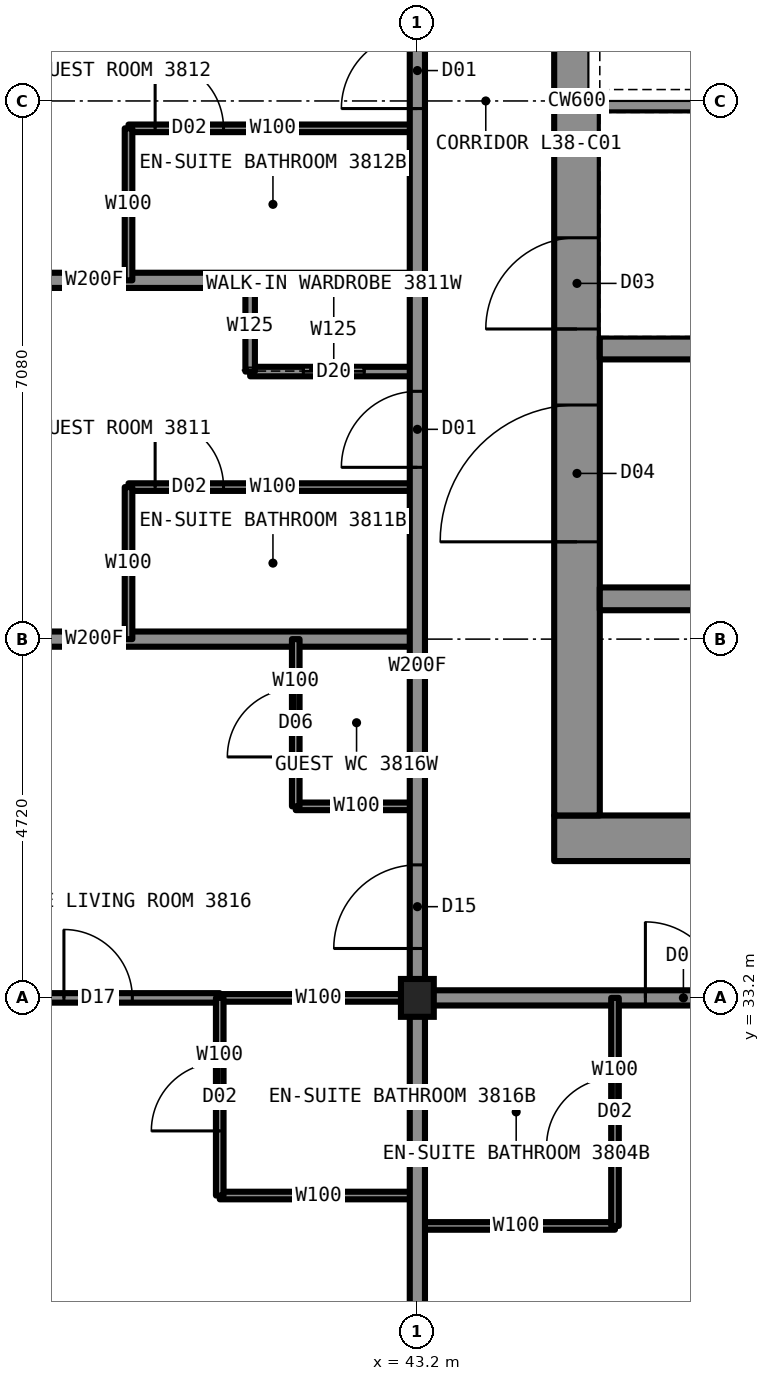
"""IFC4 building model, lengths in metres.
Left out: names, types, materials, properties, quantities, classifications, styles, units other than length and angle.
Written with IfcOpenShell. Run it as: python <this file> out.ifc"""

import sys

from ifc_helpers import new_model, si_unit, direction, frame, frame_2d, origin, origin_2d, place, context, subcontext, project, spatial, rectangle, i_section, extrude, element, fill, save


model = new_model("IFC4")
c1 = context("Model", 3, precision=1e-05, world=origin(), true_north=direction((0.0, 1.0)))
c2 = subcontext(c1, "Body", "Model", "MODEL_VIEW")
j1 = project(units=[si_unit("LENGTHUNIT", "METRE"), si_unit("PLANEANGLEUNIT", "RADIAN")], contexts=[c1])
p1 = place(None, origin())
s1 = spatial("IfcSite", under=j1, at=p1, CompositionType="ELEMENT")
p2 = place(p1, origin())
s2 = spatial("IfcBuilding", under=s1, at=p2, CompositionType="ELEMENT")
p3 = place(p2, frame((0.0, 0.0, 135.4)))
s3 = spatial("IfcBuildingStorey", under=s2, at=p3, CompositionType="ELEMENT", Elevation=135.4)
p4 = place(p3, frame((43.2, 33.2, 0.0), z_axis=(0.0, 0.0, 1.0), x_axis=(1.0, 0.0, 0.0)))
e1 = element("IfcColumn", 1, at=p4, inside=s3, PredefinedType="COLUMN", context=c2, shape_type="SweptSolid", body=[
    extrude(i_section(OverallWidth=0.432, OverallDepth=0.498, WebThickness=0.056, FlangeThickness=0.089, at=origin_2d()), origin(), (0.0, 0.0, 1.0), 3.5),
])
p5 = place(p3, frame((45.0, 35.3, 0.0), z_axis=(0.0, 0.0, 1.0), x_axis=(1.0, 0.0, 0.0)))
e2 = element("IfcWall", 2, at=p5, inside=s3, PredefinedType="SHEAR", context=c2, shape_type="SweptSolid", body=[
    extrude(rectangle(XDim=20.0, YDim=0.6, at=frame_2d((10.0, 0.0))), origin(), (0.0, 0.0, 1.0), 3.5),
])
p6 = place(p3, frame((45.3, 35.6, 0.0), z_axis=(0.0, 0.0, 1.0), x_axis=(0.0, 1.0, 0.0)))
e3 = element("IfcWall", 3, at=p6, inside=s3, PredefinedType="SHEAR", context=c2, shape_type="SweptSolid", body=[
    extrude(rectangle(XDim=18.8, YDim=0.6, at=frame_2d((9.4, 0.0))), origin(), (0.0, 0.0, 1.0), 3.5),
])
p7 = place(p6, frame((13.4, 0.0, 0.0)))
e4 = element("IfcOpeningElement", 4, at=p7, cuts=e3, PredefinedType="OPENING", context=c2, shape_type="SweptSolid", body=[
    extrude(rectangle(XDim=1.8, YDim=2.2, at=frame_2d((0.9, 1.1))), frame((0.0, 0.31, 0.0), z_axis=(0.0, -1.0, 0.0), x_axis=(1.0, 0.0, 0.0)), (0.0, 0.0, 1.0), 0.62),
])
p8 = place(p6, frame((3.6, 0.0, 0.0)))
e5 = element("IfcOpeningElement", 5, at=p8, cuts=e3, PredefinedType="OPENING", context=c2, shape_type="SweptSolid", body=[
    extrude(rectangle(XDim=1.8, YDim=2.2, at=frame_2d((0.9, 1.1))), frame((0.0, 0.31, 0.0), z_axis=(0.0, -1.0, 0.0), x_axis=(1.0, 0.0, 0.0)), (0.0, 0.0, 1.0), 0.62),
])
p9 = place(p6, frame((6.4, 0.0, 0.0)))
e6 = element("IfcOpeningElement", 6, at=p9, cuts=e3, PredefinedType="OPENING", context=c2, shape_type="SweptSolid", body=[
    extrude(rectangle(XDim=1.2, YDim=2.2, at=frame_2d((0.6, 1.1))), frame((0.0, 0.31, 0.0), z_axis=(0.0, -1.0, 0.0), x_axis=(1.0, 0.0, 0.0)), (0.0, 0.0, 1.0), 0.62),
])
p10 = place(p3, frame((45.6, 38.45, 0.0), z_axis=(0.0, 0.0, 1.0), x_axis=(1.0, 0.0, 0.0)))
e7 = element("IfcWall", 7, at=p10, inside=s3, PredefinedType="SHEAR", context=c2, shape_type="SweptSolid", body=[
    extrude(rectangle(XDim=18.8, YDim=0.3, at=frame_2d((9.4, 0.0))), origin(), (0.0, 0.0, 1.0), 3.5),
])
p11 = place(p3, frame((45.6, 41.75, 0.0), z_axis=(0.0, 0.0, 1.0), x_axis=(1.0, 0.0, 0.0)))
e8 = element("IfcWall", 8, at=p11, inside=s3, PredefinedType="SHEAR", context=c2, shape_type="SweptSolid", body=[
    extrude(rectangle(XDim=7.1, YDim=0.3, at=frame_2d((3.55, 0.0))), origin(), (0.0, 0.0, 1.0), 3.5),
])
p12 = place(p3, frame((45.6, 45.0, 0.0), z_axis=(0.0, 0.0, 1.0), x_axis=(1.0, 0.0, 0.0)))
e9 = element("IfcWall", 9, at=p12, inside=s3, PredefinedType="SHEAR", context=c2, shape_type="SweptSolid", body=[
    extrude(rectangle(XDim=6.8, YDim=0.3, at=frame_2d((3.4, 0.0))), origin(), (0.0, 0.0, 1.0), 3.5),
])
p13 = place(p3, frame((39.4, 44.64, 0.0), z_axis=(0.0, 0.0, 1.0), x_axis=(1.0, 0.0, 0.0)))
e10 = element("IfcWall", 10, at=p13, inside=s3, PredefinedType="PARTITIONING", context=c2, shape_type="SweptSolid", body=[
    extrude(rectangle(XDim=3.8, YDim=0.1, at=frame_2d((1.9, 0.0))), origin(), (0.0, 0.0, 1.0), 3.33),
])
p14 = place(p13, frame((0.35, 0.0, 0.0)))
e11 = element("IfcOpeningElement", 11, at=p14, cuts=e10, PredefinedType="OPENING", context=c2, shape_type="SweptSolid", body=[
    extrude(rectangle(XDim=0.9, YDim=2.1, at=frame_2d((0.45, 1.05))), frame((0.0, 0.06, 0.0), z_axis=(0.0, -1.0, 0.0), x_axis=(1.0, 0.0, 0.0)), (0.0, 0.0, 1.0), 0.12),
])
p15 = place(p3, frame((40.6, 33.2, 0.0), z_axis=(0.0, 0.0, 1.0), x_axis=(1.0, 0.0, 0.0)))
e12 = element("IfcWall", 12, at=p15, inside=s3, PredefinedType="PARTITIONING", context=c2, shape_type="SweptSolid", body=[
    extrude(rectangle(XDim=2.6, YDim=0.1, at=frame_2d((1.3, 0.0))), origin(), (0.0, 0.0, 1.0), 2.573),
])
p16 = place(p3, frame((43.2, 33.2, 0.0), z_axis=(0.0, 0.0, 1.0), x_axis=(1.0, 0.0, 0.0)))
e13 = element("IfcWall", 13, at=p16, inside=s3, PredefinedType="PARTITIONING", context=c2, shape_type="SweptSolid", body=[
    extrude(rectangle(XDim=23.6, YDim=0.2, at=frame_2d((11.8, 0.0))), origin(), (0.0, 0.0, 1.0), 3.33),
])
p17 = place(p16, frame((3.0, 0.0, 0.0)))
e14 = element("IfcOpeningElement", 14, at=p17, cuts=e13, PredefinedType="OPENING", context=c2, shape_type="SweptSolid", body=[
    extrude(rectangle(XDim=1.0, YDim=2.2, at=frame_2d((0.5, 1.1))), frame((0.0, 0.11, 0.0), z_axis=(0.0, -1.0, 0.0), x_axis=(1.0, 0.0, 0.0)), (0.0, 0.0, 1.0), 0.22),
])
p18 = place(p16, frame((9.84, 0.0, 0.0)))
e15 = element("IfcOpeningElement", 15, at=p18, cuts=e13, PredefinedType="OPENING", context=c2, shape_type="SweptSolid", body=[
    extrude(rectangle(XDim=1.0, YDim=2.2, at=frame_2d((0.5, 1.1))), frame((0.0, 0.11, 0.0), z_axis=(0.0, -1.0, 0.0), x_axis=(1.0, 0.0, 0.0)), (0.0, 0.0, 1.0), 0.22),
])
p19 = place(p16, frame((16.71, 0.0, 0.0)))
e16 = element("IfcOpeningElement", 16, at=p19, cuts=e13, PredefinedType="OPENING", context=c2, shape_type="SweptSolid", body=[
    extrude(rectangle(XDim=1.0, YDim=2.2, at=frame_2d((0.5, 1.1))), frame((0.0, 0.11, 0.0), z_axis=(0.0, -1.0, 0.0), x_axis=(1.0, 0.0, 0.0)), (0.0, 0.0, 1.0), 0.22),
])
p20 = place(p16, frame((20.34, 0.0, 0.0)))
e17 = element("IfcOpeningElement", 17, at=p20, cuts=e13, PredefinedType="OPENING", context=c2, shape_type="SweptSolid", body=[
    extrude(rectangle(XDim=1.0, YDim=2.2, at=frame_2d((0.5, 1.1))), frame((0.0, 0.11, 0.0), z_axis=(0.0, -1.0, 0.0), x_axis=(1.0, 0.0, 0.0)), (0.0, 0.0, 1.0), 0.22),
])
p21 = place(p3, frame((34.7, 33.2, 0.0), z_axis=(0.0, 0.0, 1.0), x_axis=(1.0, 0.0, 0.0)))
e18 = element("IfcWall", 18, at=p21, inside=s3, PredefinedType="PARTITIONING", context=c2, shape_type="SweptSolid", body=[
    extrude(rectangle(XDim=5.9, YDim=0.125, at=frame_2d((2.95, 0.0))), origin(), (0.0, 0.0, 1.0), 2.573),
])
p22 = place(p21, frame((3.85, 0.0, 0.0)))
e19 = element("IfcOpeningElement", 19, at=p22, cuts=e18, PredefinedType="OPENING", context=c2, shape_type="SweptSolid", body=[
    extrude(rectangle(XDim=0.9, YDim=2.2, at=frame_2d((0.45, 1.1))), frame((0.0, 0.073, 0.0), z_axis=(0.0, -1.0, 0.0), x_axis=(1.0, 0.0, 0.0)), (0.0, 0.0, 1.0), 0.145),
])
p23 = place(p3, frame((40.6, 30.6, 0.0), z_axis=(0.0, 0.0, 1.0), x_axis=(1.0, 0.0, 0.0)))
e20 = element("IfcWall", 20, at=p23, inside=s3, PredefinedType="PARTITIONING", context=c2, shape_type="SweptSolid", body=[
    extrude(rectangle(XDim=2.6, YDim=0.1, at=frame_2d((1.3, 0.0))), origin(), (0.0, 0.0, 1.0), 3.33),
])
p24 = place(p3, frame((43.2, 30.2, 0.0), z_axis=(0.0, 0.0, 1.0), x_axis=(1.0, 0.0, 0.0)))
e21 = element("IfcWall", 21, at=p24, inside=s3, PredefinedType="PARTITIONING", context=c2, shape_type="SweptSolid", body=[
    extrude(rectangle(XDim=2.6, YDim=0.1, at=frame_2d((1.3, 0.0))), origin(), (0.0, 0.0, 1.0), 3.33),
])
p25 = place(p3, frame((34.7, 42.64, 0.0), z_axis=(0.0, 0.0, 1.0), x_axis=(1.0, 0.0, 0.0)))
e22 = element("IfcWall", 22, at=p25, inside=s3, PredefinedType="PARTITIONING", context=c2, shape_type="SweptSolid", body=[
    extrude(rectangle(XDim=8.5, YDim=0.2, at=frame_2d((4.25, 0.0))), origin(), (0.0, 0.0, 1.0), 2.731),
])
p26 = place(p3, frame((41.0, 41.44, 0.0), z_axis=(0.0, 0.0, 1.0), x_axis=(1.0, 0.0, 0.0)))
e23 = element("IfcWall", 23, at=p26, inside=s3, PredefinedType="PARTITIONING", context=c2, shape_type="SweptSolid", body=[
    extrude(rectangle(XDim=2.2, YDim=0.125, at=frame_2d((1.1, 0.0))), origin(), (0.0, 0.0, 1.0), 3.33),
])
p27 = place(p26, frame((0.7, 0.0, 0.0)))
e24 = element("IfcOpeningElement", 24, at=p27, cuts=e23, PredefinedType="OPENING", context=c2, shape_type="SweptSolid", body=[
    extrude(rectangle(XDim=0.8, YDim=2.1, at=frame_2d((0.4, 1.05))), frame((0.0, 0.073, 0.0), z_axis=(0.0, -1.0, 0.0), x_axis=(1.0, 0.0, 0.0)), (0.0, 0.0, 1.0), 0.145),
])
p28 = place(p3, frame((39.4, 39.92, 0.0), z_axis=(0.0, 0.0, 1.0), x_axis=(1.0, 0.0, 0.0)))
e25 = element("IfcWall", 25, at=p28, inside=s3, PredefinedType="PARTITIONING", context=c2, shape_type="SweptSolid", body=[
    extrude(rectangle(XDim=3.8, YDim=0.1, at=frame_2d((1.9, 0.0))), origin(), (0.0, 0.0, 1.0), 3.33),
])
p29 = place(p28, frame((0.35, 0.0, 0.0)))
e26 = element("IfcOpeningElement", 26, at=p29, cuts=e25, PredefinedType="OPENING", context=c2, shape_type="SweptSolid", body=[
    extrude(rectangle(XDim=0.9, YDim=2.1, at=frame_2d((0.45, 1.05))), frame((0.0, 0.06, 0.0), z_axis=(0.0, -1.0, 0.0), x_axis=(1.0, 0.0, 0.0)), (0.0, 0.0, 1.0), 0.12),
])
p30 = place(p3, frame((34.7, 37.92, 0.0), z_axis=(0.0, 0.0, 1.0), x_axis=(1.0, 0.0, 0.0)))
e27 = element("IfcWall", 27, at=p30, inside=s3, PredefinedType="PARTITIONING", context=c2, shape_type="SweptSolid", body=[
    extrude(rectangle(XDim=8.5, YDim=0.2, at=frame_2d((4.25, 0.0))), origin(), (0.0, 0.0, 1.0), 2.573),
])
p31 = place(p3, frame((41.6, 35.72, 0.0), z_axis=(0.0, 0.0, 1.0), x_axis=(1.0, 0.0, 0.0)))
e28 = element("IfcWall", 28, at=p31, inside=s3, PredefinedType="PARTITIONING", context=c2, shape_type="SweptSolid", body=[
    extrude(rectangle(XDim=1.6, YDim=0.1, at=frame_2d((0.8, 0.0))), origin(), (0.0, 0.0, 1.0), 3.33),
])
p32 = place(p3, frame((43.2, 33.2, 0.0), z_axis=(0.0, 0.0, 1.0), x_axis=(0.0, 1.0, 0.0)))
e29 = element("IfcWall", 29, at=p32, inside=s3, PredefinedType="PARTITIONING", context=c2, shape_type="SweptSolid", body=[
    extrude(rectangle(XDim=23.6, YDim=0.2, at=frame_2d((11.8, 0.0))), origin(), (0.0, 0.0, 1.0), 3.33),
])
p33 = place(p32, frame((6.98, 0.0, 0.0)))
e30 = element("IfcOpeningElement", 30, at=p33, cuts=e29, PredefinedType="OPENING", context=c2, shape_type="SweptSolid", body=[
    extrude(rectangle(XDim=1.0, YDim=2.2, at=frame_2d((0.5, 1.1))), frame((0.0, 0.11, 0.0), z_axis=(0.0, -1.0, 0.0), x_axis=(1.0, 0.0, 0.0)), (0.0, 0.0, 1.0), 0.22),
])
p34 = place(p32, frame((11.7, 0.0, 0.0)))
e31 = element("IfcOpeningElement", 31, at=p34, cuts=e29, PredefinedType="OPENING", context=c2, shape_type="SweptSolid", body=[
    extrude(rectangle(XDim=1.0, YDim=2.2, at=frame_2d((0.5, 1.1))), frame((0.0, 0.11, 0.0), z_axis=(0.0, -1.0, 0.0), x_axis=(1.0, 0.0, 0.0)), (0.0, 0.0, 1.0), 0.22),
])
p35 = place(p32, frame((15.62, 0.0, 0.0)))
e32 = element("IfcOpeningElement", 32, at=p35, cuts=e29, PredefinedType="OPENING", context=c2, shape_type="SweptSolid", body=[
    extrude(rectangle(XDim=1.0, YDim=2.2, at=frame_2d((0.5, 1.1))), frame((0.0, 0.11, 0.0), z_axis=(0.0, -1.0, 0.0), x_axis=(1.0, 0.0, 0.0)), (0.0, 0.0, 1.0), 0.22),
])
p36 = place(p32, frame((21.85, 0.0, 0.0)))
e33 = element("IfcOpeningElement", 33, at=p36, cuts=e29, PredefinedType="OPENING", context=c2, shape_type="SweptSolid", body=[
    extrude(rectangle(XDim=1.1, YDim=2.2, at=frame_2d((0.55, 1.1))), frame((0.0, 0.11, 0.0), z_axis=(0.0, -1.0, 0.0), x_axis=(1.0, 0.0, 0.0)), (0.0, 0.0, 1.0), 0.22),
])
p37 = place(p32, frame((0.65, 0.0, 0.0)))
e34 = element("IfcOpeningElement", 34, at=p37, cuts=e29, PredefinedType="OPENING", context=c2, shape_type="SweptSolid", body=[
    extrude(rectangle(XDim=1.1, YDim=2.2, at=frame_2d((0.55, 1.1))), frame((0.0, 0.11, 0.0), z_axis=(0.0, -1.0, 0.0), x_axis=(1.0, 0.0, 0.0)), (0.0, 0.0, 1.0), 0.22),
])
p38 = place(p3, frame((43.2, 24.7, 0.0), z_axis=(0.0, 0.0, 1.0), x_axis=(0.0, 1.0, 0.0)))
e35 = element("IfcWall", 35, at=p38, inside=s3, PredefinedType="PARTITIONING", context=c2, shape_type="SweptSolid", body=[
    extrude(rectangle(XDim=8.5, YDim=0.2, at=frame_2d((4.25, 0.0))), origin(), (0.0, 0.0, 1.0), 2.573),
])
p39 = place(p3, frame((41.6, 35.72, 0.0), z_axis=(0.0, 0.0, 1.0), x_axis=(0.0, 1.0, 0.0)))
e36 = element("IfcWall", 36, at=p39, inside=s3, PredefinedType="PARTITIONING", context=c2, shape_type="SweptSolid", body=[
    extrude(rectangle(XDim=2.2, YDim=0.1, at=frame_2d((1.1, 0.0))), origin(), (0.0, 0.0, 1.0), 3.33),
])
p40 = place(p39, frame((0.65, 0.0, 0.0)))
e37 = element("IfcOpeningElement", 37, at=p40, cuts=e36, PredefinedType="OPENING", context=c2, shape_type="SweptSolid", body=[
    extrude(rectangle(XDim=0.9, YDim=2.1, at=frame_2d((0.45, 1.05))), frame((0.0, 0.06, 0.0), z_axis=(0.0, -1.0, 0.0), x_axis=(1.0, 0.0, 0.0)), (0.0, 0.0, 1.0), 0.12),
])
p41 = place(p3, frame((41.0, 41.44, 0.0), z_axis=(0.0, 0.0, 1.0), x_axis=(0.0, 1.0, 0.0)))
e38 = element("IfcWall", 38, at=p41, inside=s3, PredefinedType="PARTITIONING", context=c2, shape_type="SweptSolid", body=[
    extrude(rectangle(XDim=1.2, YDim=0.125, at=frame_2d((0.6, 0.0))), origin(), (0.0, 0.0, 1.0), 3.33),
])
p42 = place(p3, frame((40.6, 30.6, 0.0), z_axis=(0.0, 0.0, 1.0), x_axis=(0.0, 1.0, 0.0)))
e39 = element("IfcWall", 39, at=p42, inside=s3, PredefinedType="PARTITIONING", context=c2, shape_type="SweptSolid", body=[
    extrude(rectangle(XDim=2.6, YDim=0.1, at=frame_2d((1.3, 0.0))), origin(), (0.0, 0.0, 1.0), 3.33),
])
p43 = place(p42, frame((0.85, 0.0, 0.0)))
e40 = element("IfcOpeningElement", 40, at=p43, cuts=e39, PredefinedType="OPENING", context=c2, shape_type="SweptSolid", body=[
    extrude(rectangle(XDim=0.9, YDim=2.1, at=frame_2d((0.45, 1.05))), frame((0.0, 0.06, 0.0), z_axis=(0.0, -1.0, 0.0), x_axis=(1.0, 0.0, 0.0)), (0.0, 0.0, 1.0), 0.12),
])
for number, where, z_axis, x_axis in (
    (41, (39.4, 37.92, 0.0), (0.0, 0.0, 1.0), (0.0, 1.0, 0.0)),
    (42, (39.4, 42.64, 0.0), (0.0, 0.0, 1.0), (0.0, 1.0, 0.0)),
):
    element("IfcWall", number, at=place(p3, frame(where, z_axis=z_axis, x_axis=x_axis)), inside=s3, PredefinedType="PARTITIONING", context=c2, shape_type="SweptSolid", body=[
        extrude(rectangle(XDim=2.0, YDim=0.1, at=frame_2d((1.0, 0.0))), origin(), (0.0, 0.0, 1.0), 3.33),
    ])
p44 = place(p3, frame((45.8, 30.2, 0.0), z_axis=(0.0, 0.0, 1.0), x_axis=(0.0, 1.0, 0.0)))
e43 = element("IfcWall", 43, at=p44, inside=s3, PredefinedType="PARTITIONING", context=c2, shape_type="SweptSolid", body=[
    extrude(rectangle(XDim=3.0, YDim=0.1, at=frame_2d((1.5, 0.0))), origin(), (0.0, 0.0, 1.0), 3.33),
])
p45 = place(p44, frame((1.05, 0.0, 0.0)))
e44 = element("IfcOpeningElement", 44, at=p45, cuts=e43, PredefinedType="OPENING", context=c2, shape_type="SweptSolid", body=[
    extrude(rectangle(XDim=0.9, YDim=2.1, at=frame_2d((0.45, 1.05))), frame((0.0, 0.06, 0.0), z_axis=(0.0, -1.0, 0.0), x_axis=(1.0, 0.0, 0.0)), (0.0, 0.0, 1.0), 0.12),
])
p46 = place(p17, origin())
e45 = element("IfcDoor", 45, at=p46, inside=s3, OperationType="SINGLE_SWING_LEFT", PredefinedType="DOOR", context=c2, shape_type="SweptSolid", body=[
    extrude(rectangle(XDim=1.0, YDim=2.2, at=frame_2d((0.5, 1.1))), frame((0.0, 0.025, 0.0), z_axis=(0.0, -1.0, 0.0), x_axis=(1.0, 0.0, 0.0)), (0.0, 0.0, 1.0), 0.05),
])
fill(e14, e45)
p47 = place(p45, origin())
e46 = element("IfcDoor", 46, at=p47, inside=s3, OperationType="SINGLE_SWING_RIGHT", PredefinedType="DOOR", context=c2, shape_type="SweptSolid", body=[
    extrude(rectangle(XDim=0.9, YDim=2.1, at=frame_2d((0.45, 1.05))), frame((0.0, 0.025, 0.0), z_axis=(0.0, -1.0, 0.0), x_axis=(1.0, 0.0, 0.0)), (0.0, 0.0, 1.0), 0.05),
])
fill(e44, e46)
p48 = place(p33, origin())
e47 = element("IfcDoor", 47, at=p48, inside=s3, OperationType="SINGLE_SWING_LEFT", PredefinedType="DOOR", context=c2, shape_type="SweptSolid", body=[
    extrude(rectangle(XDim=1.0, YDim=2.2, at=frame_2d((0.5, 1.1))), frame((0.0, 0.025, 0.0), z_axis=(0.0, -1.0, 0.0), x_axis=(1.0, 0.0, 0.0)), (0.0, 0.0, 1.0), 0.05),
])
fill(e30, e47)
p49 = place(p29, origin())
e48 = element("IfcDoor", 48, at=p49, inside=s3, OperationType="SINGLE_SWING_RIGHT", PredefinedType="DOOR", context=c2, shape_type="SweptSolid", body=[
    extrude(rectangle(XDim=0.9, YDim=2.1, at=frame_2d((0.45, 1.05))), frame((0.0, 0.025, 0.0), z_axis=(0.0, -1.0, 0.0), x_axis=(1.0, 0.0, 0.0)), (0.0, 0.0, 1.0), 0.05),
])
fill(e26, e48)
p50 = place(p27, origin())
e49 = element("IfcDoor", 49, at=p50, inside=s3, OperationType="SLIDING_TO_LEFT", PredefinedType="DOOR", context=c2, shape_type="SweptSolid", body=[
    extrude(rectangle(XDim=0.8, YDim=2.1, at=frame_2d((0.4, 1.05))), frame((0.0, 0.025, 0.0), z_axis=(0.0, -1.0, 0.0), x_axis=(1.0, 0.0, 0.0)), (0.0, 0.0, 1.0), 0.05),
])
fill(e24, e49)
p51 = place(p34, origin())
e50 = element("IfcDoor", 50, at=p51, inside=s3, OperationType="SINGLE_SWING_LEFT", PredefinedType="DOOR", context=c2, shape_type="SweptSolid", body=[
    extrude(rectangle(XDim=1.0, YDim=2.2, at=frame_2d((0.5, 1.1))), frame((0.0, 0.025, 0.0), z_axis=(0.0, -1.0, 0.0), x_axis=(1.0, 0.0, 0.0)), (0.0, 0.0, 1.0), 0.05),
])
fill(e31, e50)
p52 = place(p14, origin())
e51 = element("IfcDoor", 51, at=p52, inside=s3, OperationType="SINGLE_SWING_RIGHT", PredefinedType="DOOR", context=c2, shape_type="SweptSolid", body=[
    extrude(rectangle(XDim=0.9, YDim=2.1, at=frame_2d((0.45, 1.05))), frame((0.0, 0.025, 0.0), z_axis=(0.0, -1.0, 0.0), x_axis=(1.0, 0.0, 0.0)), (0.0, 0.0, 1.0), 0.05),
])
fill(e11, e51)
p53 = place(p37, origin())
e52 = element("IfcDoor", 52, at=p53, inside=s3, OperationType="SINGLE_SWING_LEFT", PredefinedType="DOOR", context=c2, shape_type="SweptSolid", body=[
    extrude(rectangle(XDim=1.1, YDim=2.2, at=frame_2d((0.55, 1.1))), frame((0.0, 0.025, 0.0), z_axis=(0.0, -1.0, 0.0), x_axis=(1.0, 0.0, 0.0)), (0.0, 0.0, 1.0), 0.05),
])
fill(e34, e52)
p54 = place(p43, origin())
e53 = element("IfcDoor", 53, at=p54, inside=s3, OperationType="SINGLE_SWING_RIGHT", PredefinedType="DOOR", context=c2, shape_type="SweptSolid", body=[
    extrude(rectangle(XDim=0.9, YDim=2.1, at=frame_2d((0.45, 1.05))), frame((0.0, 0.025, 0.0), z_axis=(0.0, -1.0, 0.0), x_axis=(1.0, 0.0, 0.0)), (0.0, 0.0, 1.0), 0.05),
])
fill(e40, e53)
p55 = place(p22, origin())
e54 = element("IfcDoor", 54, at=p55, inside=s3, OperationType="SINGLE_SWING_LEFT", PredefinedType="DOOR", context=c2, shape_type="SweptSolid", body=[
    extrude(rectangle(XDim=0.9, YDim=2.2, at=frame_2d((0.45, 1.1))), frame((0.0, 0.025, 0.0), z_axis=(0.0, -1.0, 0.0), x_axis=(1.0, 0.0, 0.0)), (0.0, 0.0, 1.0), 0.05),
])
fill(e19, e54)
p56 = place(p40, origin())
e55 = element("IfcDoor", 55, at=p56, inside=s3, OperationType="SINGLE_SWING_LEFT", PredefinedType="DOOR", context=c2, shape_type="SweptSolid", body=[
    extrude(rectangle(XDim=0.9, YDim=2.1, at=frame_2d((0.45, 1.05))), frame((0.0, 0.025, 0.0), z_axis=(0.0, -1.0, 0.0), x_axis=(1.0, 0.0, 0.0)), (0.0, 0.0, 1.0), 0.05),
])
fill(e37, e55)
p57 = place(p8, origin())
e56 = element("IfcDoor", 56, at=p57, inside=s3, OperationType="DOUBLE_DOOR_SINGLE_SWING", PredefinedType="DOOR", context=c2, shape_type="SweptSolid", body=[
    extrude(rectangle(XDim=1.8, YDim=2.2, at=frame_2d((0.9, 1.1))), frame((0.0, 0.025, 0.0), z_axis=(0.0, -1.0, 0.0), x_axis=(1.0, 0.0, 0.0)), (0.0, 0.0, 1.0), 0.05),
])
fill(e5, e56)
p58 = place(p9, origin())
e57 = element("IfcDoor", 57, at=p58, inside=s3, OperationType="SINGLE_SWING_LEFT", PredefinedType="DOOR", context=c2, shape_type="SweptSolid", body=[
    extrude(rectangle(XDim=1.2, YDim=2.2, at=frame_2d((0.6, 1.1))), frame((0.0, 0.025, 0.0), z_axis=(0.0, -1.0, 0.0), x_axis=(1.0, 0.0, 0.0)), (0.0, 0.0, 1.0), 0.05),
])
fill(e6, e57)
save(model, sys.argv[1])
